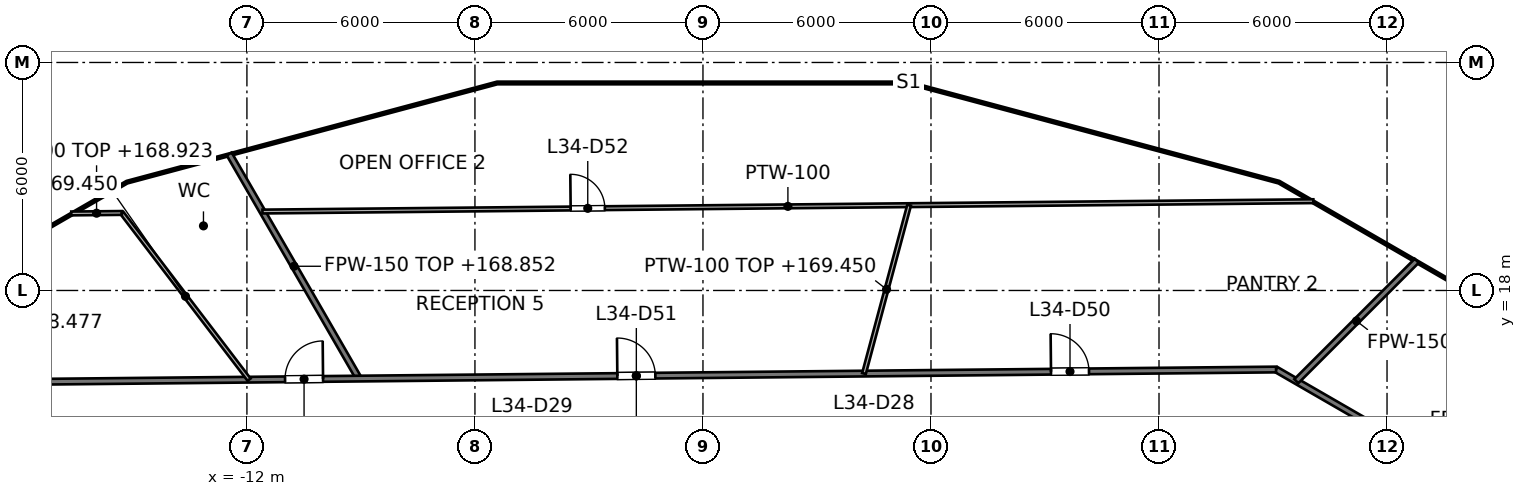
"""IFC4 building model, lengths in metres.
Left out: names, types, materials, properties, quantities, classifications, styles, units other than length and angle.
Written with IfcOpenShell. Run it as: python <this file> out.ifc"""

import sys

from ifc_helpers import new_model, si_unit, direction, frame, frame_2d, origin, place, context, subcontext, project, spatial, rectangle, extrude, element, fill, save


model = new_model("IFC4")
c1 = context("Model", 3, precision=1e-05, world=origin(), true_north=direction((0.0, 1.0)))
c2 = subcontext(c1, "Body", "Model", "MODEL_VIEW")
j1 = project(units=[si_unit("LENGTHUNIT", "METRE"), si_unit("PLANEANGLEUNIT", "RADIAN")], contexts=[c1])
p1 = place(None, origin())
s1 = spatial("IfcSite", under=j1, at=p1, CompositionType="ELEMENT")
p2 = place(p1, origin())
s2 = spatial("IfcBuilding", under=s1, at=p2, CompositionType="ELEMENT")
p3 = place(p2, frame((0.0, 0.0, 165.6)))
s3 = spatial("IfcBuildingStorey", under=s2, at=p3, CompositionType="ELEMENT", Elevation=165.6)
p4 = place(p3, frame((-12.466, 21.592, 0.0), z_axis=(0.0, 0.0, 1.0), x_axis=(0.500029032144, -0.866008641419, 0.0)))
e1 = element("IfcWall", 1, at=p4, inside=s3, PredefinedType="PARTITIONING", context=c2, shape_type="SweptSolid", body=[
    extrude(rectangle(XDim=6.824, YDim=0.15, at=frame_2d((3.412, 0.0))), origin(), (0.0, 0.0, 1.0), 3.252),
])
p5 = place(p3, frame((15.08, 15.921, 0.0), z_axis=(0.0, 0.0, 1.0), x_axis=(0.865982112089, -0.50007497592, 0.0)))
e2 = element("IfcWall", 2, at=p5, inside=s3, PredefinedType="PARTITIONING", context=c2, shape_type="SweptSolid", body=[
    extrude(rectangle(XDim=8.613, YDim=0.15, at=frame_2d((4.306, 0.0))), origin(), (0.0, 0.0, 1.0), 2.927),
])
p6 = place(p3, frame((-18.587, 15.587, 0.0), z_axis=(0.0, 0.0, 1.0), x_axis=(0.999950941879, 0.009905242833, 0.0)))
e3 = element("IfcWall", 3, at=p6, inside=s3, PredefinedType="PARTITIONING", context=c2, shape_type="SweptSolid", body=[
    extrude(rectangle(XDim=33.669, YDim=0.15, at=frame_2d((16.834, 0.0))), origin(), (0.0, 0.0, 1.0), 2.877),
])
p7 = place(p6, frame((7.591, 0.0, 0.0)))
e4 = element("IfcOpeningElement", 4, at=p7, cuts=e3, PredefinedType="OPENING", context=c2, shape_type="SweptSolid", body=[
    extrude(rectangle(XDim=1.0, YDim=2.1, at=frame_2d((0.5, 1.05))), frame((0.0, 0.075, 0.0), z_axis=(0.0, -1.0, 0.0), x_axis=(1.0, 0.0, 0.0)), (0.0, 0.0, 1.0), 0.15),
])
p8 = place(p6, frame((27.746, 0.0, 0.0)))
e5 = element("IfcOpeningElement", 5, at=p8, cuts=e3, PredefinedType="OPENING", context=c2, shape_type="SweptSolid", body=[
    extrude(rectangle(XDim=1.0, YDim=2.1, at=frame_2d((0.5, 1.05))), frame((0.0, 0.075, 0.0), z_axis=(0.0, -1.0, 0.0), x_axis=(1.0, 0.0, 0.0)), (0.0, 0.0, 1.0), 0.15),
])
p9 = place(p6, frame((16.335, 0.0, 0.0)))
e6 = element("IfcOpeningElement", 6, at=p9, cuts=e3, PredefinedType="OPENING", context=c2, shape_type="SweptSolid", body=[
    extrude(rectangle(XDim=1.0, YDim=2.1, at=frame_2d((0.5, 1.05))), frame((0.0, 0.075, 0.0), z_axis=(0.0, -1.0, 0.0), x_axis=(1.0, 0.0, 0.0)), (0.0, 0.0, 1.0), 0.15),
])
p10 = place(p3, frame((15.613, 15.613, 0.0), z_axis=(0.0, 0.0, 1.0), x_axis=(0.707106781187, 0.707106781187, 0.0)))
e7 = element("IfcWall", 7, at=p10, inside=s3, PredefinedType="PARTITIONING", context=c2, shape_type="SweptSolid", body=[
    extrude(rectangle(XDim=4.48, YDim=0.15, at=frame_2d((2.24, 0.0))), origin(), (0.0, 0.0, 1.0), 3.076),
])
p11 = place(p3, frame((-15.29, 20.04, 0.0), z_axis=(0.0, 0.0, 1.0), x_axis=(0.606556319782, -0.795040521567, 0.0)))
e8 = element("IfcWall", 8, at=p11, inside=s3, PredefinedType="PARTITIONING", context=c2, shape_type="SweptSolid", body=[
    extrude(rectangle(XDim=5.518, YDim=0.1, at=frame_2d((2.759, 0.0))), origin(), (0.0, 0.0, 1.0), 3.85),
])
p12 = place(p3, frame((-16.622, 20.027, 0.0), z_axis=(0.0, 0.0, 1.0), x_axis=(0.9999528217, 0.009713617953, 0.0)))
e9 = element("IfcWall", 9, at=p12, inside=s3, PredefinedType="PARTITIONING", context=c2, shape_type="SweptSolid", body=[
    extrude(rectangle(XDim=1.332, YDim=0.1, at=frame_2d((0.666, 0.0))), origin(), (0.0, 0.0, 1.0), 3.323),
])
p13 = place(p3, frame((-11.591, 20.077, 0.0), z_axis=(0.0, 0.0, 1.0), x_axis=(0.999951286901, 0.009870350766, 0.0)))
e10 = element("IfcWall", 10, at=p13, inside=s3, PredefinedType="PARTITIONING", context=c2, shape_type="SweptSolid", body=[
    extrude(rectangle(XDim=27.654, YDim=0.1, at=frame_2d((13.827, 0.0))), origin(), (0.0, 0.0, 1.0), 2.927),
])
p14 = place(p13, frame((8.11, 0.0, 0.0)))
e11 = element("IfcOpeningElement", 11, at=p14, cuts=e10, PredefinedType="OPENING", context=c2, shape_type="SweptSolid", body=[
    extrude(rectangle(XDim=0.9, YDim=2.1, at=frame_2d((0.45, 1.05))), frame((0.0, 0.05, 0.0), z_axis=(0.0, -1.0, 0.0), x_axis=(1.0, 0.0, 0.0)), (0.0, 0.0, 1.0), 0.1),
])
p15 = place(p3, frame((4.237, 15.814, 0.0), z_axis=(0.0, 0.0, 1.0), x_axis=(0.258900971347, 0.965903870494, 0.0)))
e12 = element("IfcWall", 12, at=p15, inside=s3, PredefinedType="PARTITIONING", context=c2, shape_type="SweptSolid", body=[
    extrude(rectangle(XDim=4.589, YDim=0.1, at=frame_2d((2.294, 0.0))), origin(), (0.0, 0.0, 1.0), 3.85),
])
p16 = place(p7, origin())
e13 = element("IfcDoor", 13, at=p16, inside=s3, OperationType="SINGLE_SWING_RIGHT", PredefinedType="DOOR", context=c2, shape_type="SweptSolid", body=[
    extrude(rectangle(XDim=1.0, YDim=2.1, at=frame_2d((0.5, 1.05))), frame((0.0, 0.025, 0.0), z_axis=(0.0, -1.0, 0.0), x_axis=(1.0, 0.0, 0.0)), (0.0, 0.0, 1.0), 0.05),
])
fill(e4, e13)
p17 = place(p8, origin())
e14 = element("IfcDoor", 14, at=p17, inside=s3, OperationType="SINGLE_SWING_LEFT", PredefinedType="DOOR", context=c2, shape_type="SweptSolid", body=[
    extrude(rectangle(XDim=1.0, YDim=2.1, at=frame_2d((0.5, 1.05))), frame((0.0, 0.025, 0.0), z_axis=(0.0, -1.0, 0.0), x_axis=(1.0, 0.0, 0.0)), (0.0, 0.0, 1.0), 0.05),
])
fill(e5, e14)
p18 = place(p9, origin())
e15 = element("IfcDoor", 15, at=p18, inside=s3, OperationType="SINGLE_SWING_LEFT", PredefinedType="DOOR", context=c2, shape_type="SweptSolid", body=[
    extrude(rectangle(XDim=1.0, YDim=2.1, at=frame_2d((0.5, 1.05))), frame((0.0, 0.025, 0.0), z_axis=(0.0, -1.0, 0.0), x_axis=(1.0, 0.0, 0.0)), (0.0, 0.0, 1.0), 0.05),
])
fill(e6, e15)
p19 = place(p14, origin())
e16 = element("IfcDoor", 16, at=p19, inside=s3, OperationType="SINGLE_SWING_LEFT", PredefinedType="DOOR", context=c2, shape_type="SweptSolid", body=[
    extrude(rectangle(XDim=0.9, YDim=2.1, at=frame_2d((0.45, 1.05))), frame((0.0, 0.025, 0.0), z_axis=(0.0, -1.0, 0.0), x_axis=(1.0, 0.0, 0.0)), (0.0, 0.0, 1.0), 0.05),
])
fill(e11, e16)
save(model, sys.argv[1])
